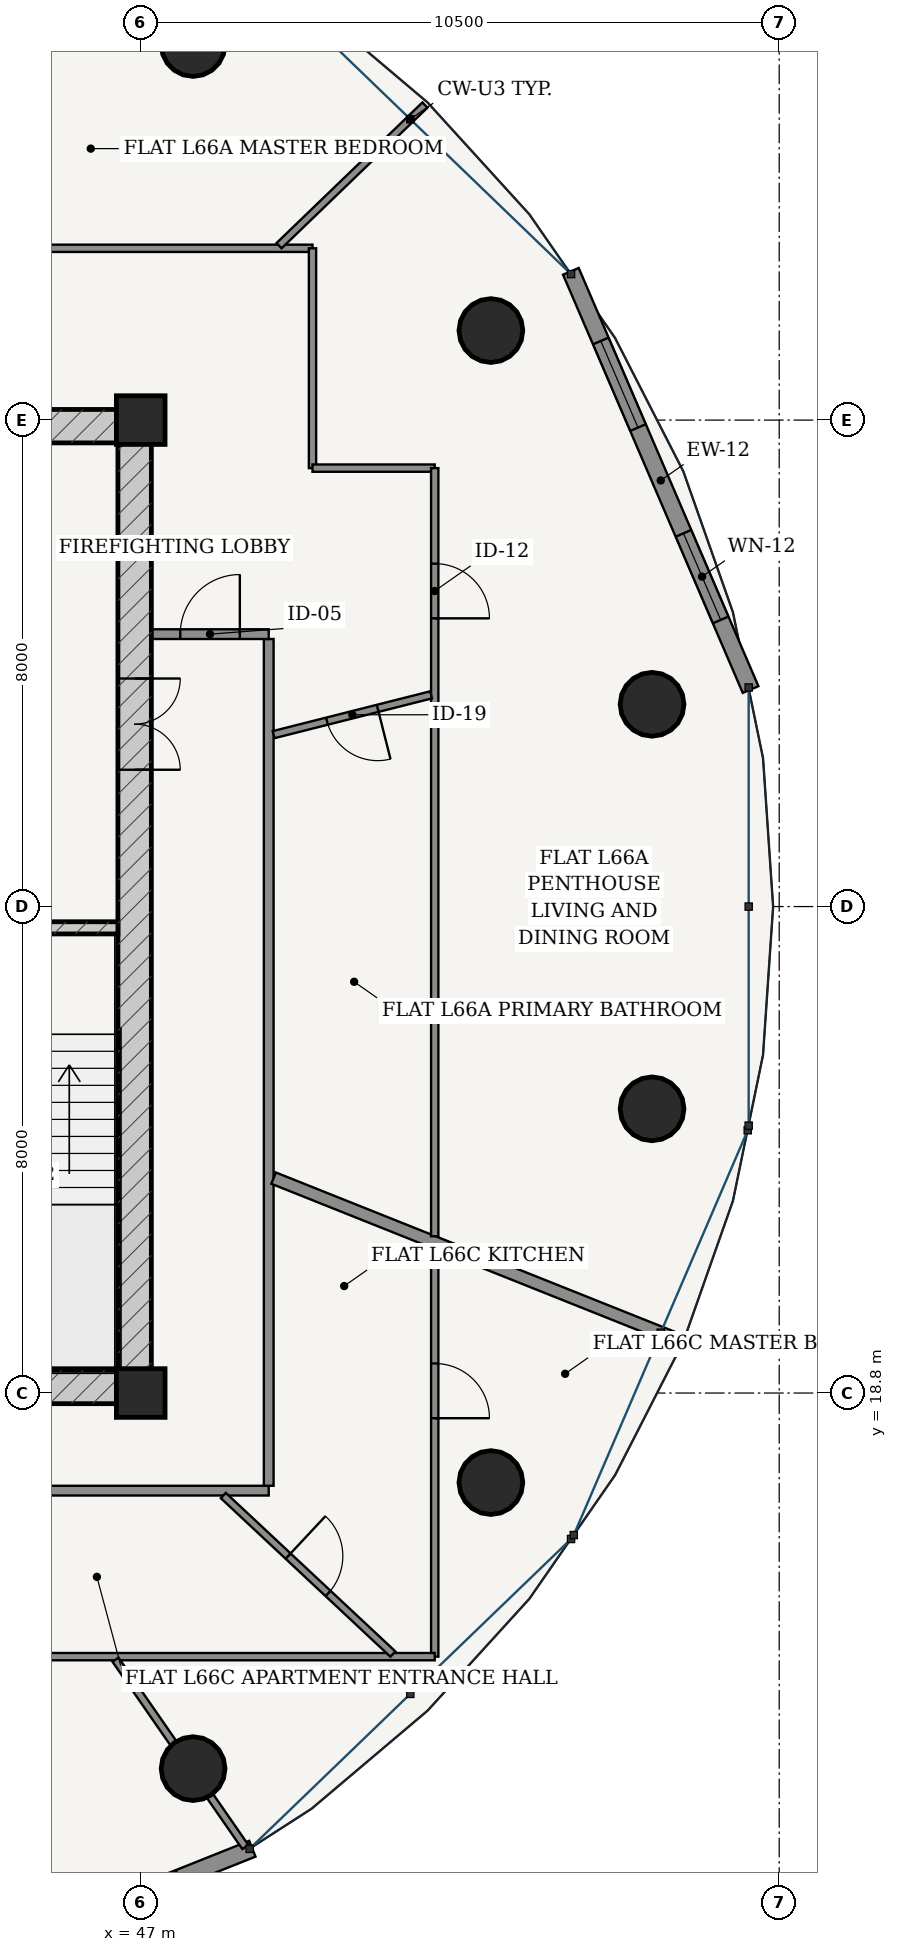
"""IFC4 building model, lengths in metres.
Left out: names, types, materials, properties, quantities, classifications, styles, units other than length and angle.
Written with IfcOpenShell. Run it as: python <this file> out.ifc"""

import sys

from ifc_helpers import new_model, si_unit, direction, frame, frame_2d, origin, origin_2d, place, context, subcontext, project, spatial, rectangle, hollow_circle, extrude, source, transform, mapped, element, fill, save


model = new_model("IFC4")
c1 = context("Model", 3, precision=1e-05, world=origin(), true_north=direction((-0.2419218956, 0.970295726276)))
c2 = subcontext(c1, "Body", "Model", "MODEL_VIEW")
j1 = project(units=[si_unit("LENGTHUNIT", "METRE"), si_unit("PLANEANGLEUNIT", "RADIAN")], contexts=[c1])
p1 = place(None, origin())
s1 = spatial("IfcSite", under=j1, at=p1, CompositionType="ELEMENT")
p2 = place(p1, origin())
s2 = spatial("IfcBuilding", under=s1, at=p2, CompositionType="ELEMENT")
p3 = place(p2, frame((0.0, 0.0, 251.95)))
s3 = spatial("IfcBuildingStorey", under=s2, at=p3, CompositionType="ELEMENT", Elevation=251.95)
for number, where, z_axis, x_axis in (
    (1, (47.0, 18.8, 0.0), (0.0, 0.0, 1.0), (1.0, 0.0, 0.0)),
    (2, (47.0, 34.8, 0.0), (0.0, 0.0, 1.0), (1.0, 0.0, 0.0)),
):
    element("IfcColumn", number, at=place(p3, frame(where, z_axis=z_axis, x_axis=x_axis)), inside=s3, PredefinedType="COLUMN", context=c2, shape_type="SweptSolid", body=[
        extrude(rectangle(XDim=0.8, YDim=0.8, at=origin_2d()), origin(), (0.0, 0.0, 1.0), 3.75),
    ])
p4 = place(p3, frame((28.825, 18.9, 0.0), z_axis=(0.0, 0.0, 1.0), x_axis=(1.0, 0.0, 0.0)))
e3 = element("IfcWall", 3, at=p4, inside=s3, PredefinedType="SHEAR", context=c2, shape_type="SweptSolid", body=[
    extrude(rectangle(XDim=18.35, YDim=0.55, at=frame_2d((9.175, 0.0))), origin(), (0.0, 0.0, 1.0), 3.49),
])
p5 = place(p4, frame((7.41, 0.0, 0.0)))
e4 = element("IfcOpeningElement", 4, at=p5, cuts=e3, PredefinedType="OPENING", context=c2, shape_type="SweptSolid", body=[
    extrude(rectangle(XDim=0.85, YDim=2.1, at=frame_2d((0.425, 1.05))), frame((0.0, 0.285, 0.0), z_axis=(0.0, -1.0, 0.0), x_axis=(1.0, 0.0, 0.0)), (0.0, 0.0, 1.0), 0.57),
])
p6 = place(p4, frame((10.49, 0.0, 0.0)))
e5 = element("IfcOpeningElement", 5, at=p6, cuts=e3, PredefinedType="OPENING", context=c2, shape_type="SweptSolid", body=[
    extrude(rectangle(XDim=0.85, YDim=2.1, at=frame_2d((0.425, 1.05))), frame((0.0, 0.285, 0.0), z_axis=(0.0, -1.0, 0.0), x_axis=(1.0, 0.0, 0.0)), (0.0, 0.0, 1.0), 0.57),
])
p7 = place(p3, frame((28.825, 34.7, 0.0), z_axis=(0.0, 0.0, 1.0), x_axis=(1.0, 0.0, 0.0)))
e6 = element("IfcWall", 6, at=p7, inside=s3, PredefinedType="SHEAR", context=c2, shape_type="SweptSolid", body=[
    extrude(rectangle(XDim=18.35, YDim=0.55, at=frame_2d((9.175, 0.0))), origin(), (0.0, 0.0, 1.0), 3.49),
])
p8 = place(p3, frame((46.9, 19.175, 0.0), z_axis=(0.0, 0.0, 1.0), x_axis=(0.0, 1.0, 0.0)))
e7 = element("IfcWall", 7, at=p8, inside=s3, PredefinedType="SHEAR", context=c2, shape_type="SweptSolid", body=[
    extrude(rectangle(XDim=15.25, YDim=0.55, at=frame_2d((7.625, 0.0))), origin(), (0.0, 0.0, 1.0), 3.49),
])
p9 = place(p8, frame((9.875, 0.0, 0.0)))
e8 = element("IfcOpeningElement", 8, at=p9, cuts=e7, PredefinedType="OPENING", context=c2, shape_type="SweptSolid", body=[
    extrude(rectangle(XDim=1.5, YDim=2.2, at=frame_2d((0.75, 1.1))), frame((0.0, 0.285, 0.0), z_axis=(0.0, -1.0, 0.0), x_axis=(1.0, 0.0, 0.0)), (0.0, 0.0, 1.0), 0.57),
])
p10 = place(p3, frame((43.305, 26.45, 0.0), z_axis=(0.0, 0.0, 1.0), x_axis=(1.0, 0.0, 0.0)))
e9 = element("IfcWall", 9, at=p10, inside=s3, PredefinedType="SOLIDWALL", context=c2, shape_type="SweptSolid", body=[
    extrude(rectangle(XDim=3.32, YDim=0.2, at=frame_2d((1.66, 0.0))), origin(), (0.0, 0.0, 1.0), 3.49),
])
p11 = place(p10, frame((1.185, 0.0, 0.0)))
e10 = element("IfcOpeningElement", 10, at=p11, cuts=e9, PredefinedType="OPENING", context=c2, shape_type="SweptSolid", body=[
    extrude(rectangle(XDim=0.95, YDim=2.15, at=frame_2d((0.475, 1.075))), frame((0.0, 0.11, 0.0), z_axis=(0.0, -1.0, 0.0), x_axis=(1.0, 0.0, 0.0)), (0.0, 0.0, 1.0), 0.22),
])
for number, where, z_axis, x_axis in (
    (11, (55.409, 30.126, 0.0), (0.0, 0.0, 1.0), (1.0, 0.0, 0.0)),
    (12, (52.759, 36.272, 0.0), (0.0, 0.0, 1.0), (1.0, 0.0, 0.0)),
    (13, (47.861, 40.977, 0.0), (0.0, 0.0, 1.0), (1.0, 0.0, 0.0)),
    (14, (47.861, 12.624, 0.0), (0.0, 0.0, 1.0), (1.0, 0.0, 0.0)),
    (15, (52.759, 17.328, 0.0), (0.0, 0.0, 1.0), (1.0, 0.0, 0.0)),
    (16, (55.409, 23.474, 0.0), (0.0, 0.0, 1.0), (1.0, 0.0, 0.0)),
):
    element("IfcColumn", number, at=place(p3, frame(where, z_axis=z_axis, x_axis=x_axis)), inside=s3, PredefinedType="COLUMN", context=c2, shape_type="SweptSolid", body=[
        extrude(hollow_circle(Radius=0.525, WallThickness=0.035, at=origin_2d()), origin(), (0.0, 0.0, 1.0), 3.75),
    ])
p12 = place(p3, frame((57.029, 30.369, 0.0), z_axis=(0.0, 0.0, 1.0), x_axis=(-0.394816612978, 0.918759948037, 0.0)))
e17 = element("IfcWall", 17, at=p12, inside=s3, PredefinedType="SOLIDWALL", context=c2, shape_type="SweptSolid", body=[
    extrude(rectangle(XDim=7.485, YDim=0.28, at=frame_2d((3.743, 0.0))), origin(), (0.0, 0.0, 1.0), 3.49),
])
p13 = place(p12, frame((1.246, 0.0, 0.85)))
e18 = element("IfcOpeningElement", 18, at=p13, cuts=e17, PredefinedType="OPENING", context=c2, shape_type="SweptSolid", body=[
    extrude(rectangle(XDim=1.55, YDim=1.95, at=frame_2d((0.775, 0.975))), frame((0.0, 0.15, 0.0), z_axis=(0.0, -1.0, 0.0), x_axis=(1.0, 0.0, 0.0)), (0.0, 0.0, 1.0), 0.3),
])
p14 = place(p12, frame((4.689, 0.0, 0.85)))
e19 = element("IfcOpeningElement", 19, at=p14, cuts=e17, PredefinedType="OPENING", context=c2, shape_type="SweptSolid", body=[
    extrude(rectangle(XDim=1.55, YDim=1.95, at=frame_2d((0.775, 0.975))), frame((0.0, 0.15, 0.0), z_axis=(0.0, -1.0, 0.0), x_axis=(1.0, 0.0, 0.0)), (0.0, 0.0, 1.0), 0.3),
])
p15 = place(p3, frame((41.705, 8.459, 0.0), z_axis=(0.0, 0.0, 1.0), x_axis=(0.92871332341, 0.370798547626, 0.0)))
e20 = element("IfcWall", 20, at=p15, inside=s3, PredefinedType="SOLIDWALL", context=c2, shape_type="SweptSolid", body=[
    extrude(rectangle(XDim=7.678, YDim=0.28, at=frame_2d((3.839, 0.0))), origin(), (0.0, 0.0, 1.0), 3.49),
])
p16 = place(p15, frame((1.298, 0.0, 0.85)))
e21 = element("IfcOpeningElement", 21, at=p16, cuts=e20, PredefinedType="OPENING", context=c2, shape_type="SweptSolid", body=[
    extrude(rectangle(XDim=1.55, YDim=1.95, at=frame_2d((0.775, 0.975))), frame((0.0, 0.15, 0.0), z_axis=(0.0, -1.0, 0.0), x_axis=(1.0, 0.0, 0.0)), (0.0, 0.0, 1.0), 0.3),
])
p17 = place(p15, frame((4.83, 0.0, 0.85)))
e22 = element("IfcOpeningElement", 22, at=p17, cuts=e20, PredefinedType="OPENING", context=c2, shape_type="SweptSolid", body=[
    extrude(rectangle(XDim=1.55, YDim=1.95, at=frame_2d((0.775, 0.975))), frame((0.0, 0.15, 0.0), z_axis=(0.0, -1.0, 0.0), x_axis=(1.0, 0.0, 0.0)), (0.0, 0.0, 1.0), 0.3),
])
p18 = place(p3, frame((26.895, 17.195, 0.0), z_axis=(0.0, 0.0, 1.0), x_axis=(1.0, 0.0, 0.0)))
e23 = element("IfcWall", 23, at=p18, inside=s3, PredefinedType="PARTITIONING", context=c2, shape_type="SweptSolid", body=[
    extrude(rectangle(XDim=22.21, YDim=0.16, at=frame_2d((11.105, 0.0))), origin(), (0.0, 0.0, 1.0), 3.015),
])
p19 = place(p18, frame((2.861, 0.0, 0.0)))
e24 = element("IfcOpeningElement", 24, at=p19, cuts=e23, PredefinedType="OPENING", context=c2, shape_type="SweptSolid", body=[
    extrude(rectangle(XDim=0.98, YDim=2.2, at=frame_2d((0.49, 1.1))), frame((0.0, 0.09, 0.0), z_axis=(0.0, -1.0, 0.0), x_axis=(1.0, 0.0, 0.0)), (0.0, 0.0, 1.0), 0.18),
])
p20 = place(p18, frame((16.97, 0.0, 0.0)))
e25 = element("IfcOpeningElement", 25, at=p20, cuts=e23, PredefinedType="OPENING", context=c2, shape_type="SweptSolid", body=[
    extrude(rectangle(XDim=0.98, YDim=2.2, at=frame_2d((0.49, 1.1))), frame((0.0, 0.09, 0.0), z_axis=(0.0, -1.0, 0.0), x_axis=(1.0, 0.0, 0.0)), (0.0, 0.0, 1.0), 0.18),
])
p21 = place(p3, frame((49.105, 17.275, 0.0), z_axis=(0.0, 0.0, 1.0), x_axis=(0.0, 1.0, 0.0)))
e26 = element("IfcWall", 26, at=p21, inside=s3, PredefinedType="PARTITIONING", context=c2, shape_type="SweptSolid", body=[
    extrude(rectangle(XDim=13.925, YDim=0.16, at=frame_2d((6.962, 0.0))), origin(), (0.0, 0.0, 1.0), 3.015),
])
p22 = place(p3, frame((47.175, 31.28, 0.0), z_axis=(0.0, 0.0, 1.0), x_axis=(1.0, 0.0, 0.0)))
e27 = element("IfcWall", 27, at=p22, inside=s3, PredefinedType="PARTITIONING", context=c2, shape_type="SweptSolid", body=[
    extrude(rectangle(XDim=1.93, YDim=0.16, at=frame_2d((0.965, 0.0))), origin(), (0.0, 0.0, 1.0), 3.49),
])
p23 = place(p22, frame((0.475, 0.0, 0.0)))
e28 = element("IfcOpeningElement", 28, at=p23, cuts=e27, PredefinedType="OPENING", context=c2, shape_type="SweptSolid", body=[
    extrude(rectangle(XDim=0.98, YDim=2.2, at=frame_2d((0.49, 1.1))), frame((0.0, 0.09, 0.0), z_axis=(0.0, -1.0, 0.0), x_axis=(1.0, 0.0, 0.0)), (0.0, 0.0, 1.0), 0.18),
])
p24 = place(p3, frame((49.185, 22.334, 0.0), z_axis=(0.0, 0.0, 1.0), x_axis=(0.928710518269, -0.370805573389, 0.0)))
e29 = element("IfcWall", 29, at=p24, inside=s3, PredefinedType="PARTITIONING", context=c2, shape_type="SweptSolid", body=[
    extrude(rectangle(XDim=7.195, YDim=0.2, at=frame_2d((3.598, 0.0))), origin(), (0.0, 0.0, 1.0), 3.121),
])
p25 = place(p3, frame((26.175, 37.625, 0.0), z_axis=(0.0, 0.0, 1.0), x_axis=(1.0, 0.0, 0.0)))
e30 = element("IfcWall", 30, at=p25, inside=s3, PredefinedType="PARTITIONING", context=c2, shape_type="SweptSolid", body=[
    extrude(rectangle(XDim=23.65, YDim=0.12, at=frame_2d((11.825, 0.0))), origin(), (0.0, 0.0, 1.0), 3.015),
])
p26 = place(p25, frame((12.791, 0.0, 0.0)))
e31 = element("IfcOpeningElement", 31, at=p26, cuts=e30, PredefinedType="OPENING", context=c2, shape_type="SweptSolid", body=[
    extrude(rectangle(XDim=0.9, YDim=2.15, at=frame_2d((0.45, 1.075))), frame((0.0, 0.07, 0.0), z_axis=(0.0, -1.0, 0.0), x_axis=(1.0, 0.0, 0.0)), (0.0, 0.0, 1.0), 0.14),
])
p27 = place(p25, frame((6.48, 0.0, 0.0)))
e32 = element("IfcOpeningElement", 32, at=p27, cuts=e30, PredefinedType="OPENING", context=c2, shape_type="SweptSolid", body=[
    extrude(rectangle(XDim=0.9, YDim=2.15, at=frame_2d((0.45, 1.075))), frame((0.0, 0.07, 0.0), z_axis=(0.0, -1.0, 0.0), x_axis=(1.0, 0.0, 0.0)), (0.0, 0.0, 1.0), 0.14),
])
p28 = place(p25, frame((1.831, 0.0, 0.0)))
e33 = element("IfcOpeningElement", 33, at=p28, cuts=e30, PredefinedType="OPENING", context=c2, shape_type="SweptSolid", body=[
    extrude(rectangle(XDim=0.9, YDim=2.15, at=frame_2d((0.45, 1.075))), frame((0.0, 0.07, 0.0), z_axis=(0.0, -1.0, 0.0), x_axis=(1.0, 0.0, 0.0)), (0.0, 0.0, 1.0), 0.14),
])
p29 = place(p3, frame((49.825, 37.625, 0.0), z_axis=(0.0, 0.0, 1.0), x_axis=(0.0, -1.0, 0.0)))
e34 = element("IfcWall", 34, at=p29, inside=s3, PredefinedType="PARTITIONING", context=c2, shape_type="SweptSolid", body=[
    extrude(rectangle(XDim=3.615, YDim=0.12, at=frame_2d((1.808, 0.0))), origin(), (0.0, 0.0, 1.0), 3.015),
])
p30 = place(p3, frame((49.825, 34.01, 0.0), z_axis=(0.0, 0.0, 1.0), x_axis=(1.0, 0.0, 0.0)))
e35 = element("IfcWall", 35, at=p30, inside=s3, PredefinedType="PARTITIONING", context=c2, shape_type="SweptSolid", body=[
    extrude(rectangle(XDim=2.01, YDim=0.12, at=frame_2d((1.005, 0.0))), origin(), (0.0, 0.0, 1.0), 3.209),
])
p31 = place(p3, frame((51.835, 34.01, 0.0), z_axis=(0.0, 0.0, 1.0), x_axis=(0.0, -1.0, 0.0)))
e36 = element("IfcWall", 36, at=p31, inside=s3, PredefinedType="PARTITIONING", context=c2, shape_type="SweptSolid", body=[
    extrude(rectangle(XDim=12.632, YDim=0.12, at=frame_2d((6.316, 0.0))), origin(), (0.0, 0.0, 1.0), 3.015),
])
p32 = place(p31, frame((1.57, 0.0, 0.0)))
e37 = element("IfcOpeningElement", 37, at=p32, cuts=e36, PredefinedType="OPENING", context=c2, shape_type="SweptSolid", body=[
    extrude(rectangle(XDim=0.9, YDim=2.15, at=frame_2d((0.45, 1.075))), frame((0.0, 0.07, 0.0), z_axis=(0.0, -1.0, 0.0), x_axis=(1.0, 0.0, 0.0)), (0.0, 0.0, 1.0), 0.14),
])
p33 = place(p3, frame((49.275, 37.668, 0.0), z_axis=(0.0, 0.0, 1.0), x_axis=(0.719954096891, 0.694021684366, 0.0)))
e38 = element("IfcWall", 38, at=p33, inside=s3, PredefinedType="PARTITIONING", context=c2, shape_type="SweptSolid", body=[
    extrude(rectangle(XDim=3.333, YDim=0.12, at=frame_2d((1.667, 0.0))), origin(), (0.0, 0.0, 1.0), 3.121),
])
p34 = place(p3, frame((49.185, 29.627, 0.0), z_axis=(0.0, 0.0, 1.0), x_axis=(0.969515658159, 0.2450293627, 0.0)))
e39 = element("IfcWall", 39, at=p34, inside=s3, PredefinedType="PARTITIONING", context=c2, shape_type="SweptSolid", body=[
    extrude(rectangle(XDim=2.671, YDim=0.12, at=frame_2d((1.336, 0.0))), origin(), (0.0, 0.0, 1.0), 3.209),
])
p35 = place(p34, frame((0.906, 0.0, 0.0)))
e40 = element("IfcOpeningElement", 40, at=p35, cuts=e39, PredefinedType="OPENING", context=c2, shape_type="SweptSolid", body=[
    extrude(rectangle(XDim=0.86, YDim=2.15, at=frame_2d((0.43, 1.075))), frame((0.0, 0.07, 0.0), z_axis=(0.0, -1.0, 0.0), x_axis=(1.0, 0.0, 0.0)), (0.0, 0.0, 1.0), 0.14),
])
p36 = place(p3, frame((51.835, 21.174, 0.0), z_axis=(0.0, 0.0, 1.0), x_axis=(0.0, -1.0, 0.0)))
e41 = element("IfcWall", 41, at=p36, inside=s3, PredefinedType="PARTITIONING", context=c2, shape_type="SweptSolid", body=[
    extrude(rectangle(XDim=6.709, YDim=0.12, at=frame_2d((3.354, 0.0))), origin(), (0.0, 0.0, 1.0), 3.015),
])
p37 = place(p36, frame((1.888, 0.0, 0.0)))
e42 = element("IfcOpeningElement", 42, at=p37, cuts=e41, PredefinedType="OPENING", context=c2, shape_type="SweptSolid", body=[
    extrude(rectangle(XDim=0.9, YDim=2.15, at=frame_2d((0.45, 1.075))), frame((0.0, 0.07, 0.0), z_axis=(0.0, -1.0, 0.0), x_axis=(1.0, 0.0, 0.0)), (0.0, 0.0, 1.0), 0.14),
])
p38 = place(p3, frame((51.835, 14.465, 0.0), z_axis=(0.0, 0.0, 1.0), x_axis=(-1.0, 0.0, 0.0)))
e43 = element("IfcWall", 43, at=p38, inside=s3, PredefinedType="PARTITIONING", context=c2, shape_type="SweptSolid", body=[
    extrude(rectangle(XDim=16.278, YDim=0.12, at=frame_2d((8.139, 0.0))), origin(), (0.0, 0.0, 1.0), 3.015),
])
p39 = place(p38, frame((7.665, 0.0, 0.0)))
e44 = element("IfcOpeningElement", 44, at=p39, cuts=e43, PredefinedType="OPENING", context=c2, shape_type="SweptSolid", body=[
    extrude(rectangle(XDim=0.9, YDim=2.15, at=frame_2d((0.45, 1.075))), frame((0.0, 0.07, 0.0), z_axis=(0.0, -1.0, 0.0), x_axis=(1.0, 0.0, 0.0)), (0.0, 0.0, 1.0), 0.14),
])
p40 = place(p3, frame((46.586, 14.414, 0.0), z_axis=(0.0, 0.0, 1.0), x_axis=(0.569657021681, -0.821882520589, 0.0)))
e45 = element("IfcWall", 45, at=p40, inside=s3, PredefinedType="PARTITIONING", context=c2, shape_type="SweptSolid", body=[
    extrude(rectangle(XDim=3.748, YDim=0.12, at=frame_2d((1.874, 0.0))), origin(), (0.0, 0.0, 1.0), 3.015),
])
p41 = place(p3, frame((48.358, 17.115, 0.0), z_axis=(0.0, 0.0, 1.0), x_axis=(0.730431927487, -0.682985504464, 0.0)))
e46 = element("IfcWall", 46, at=p41, inside=s3, PredefinedType="PARTITIONING", context=c2, shape_type="SweptSolid", body=[
    extrude(rectangle(XDim=3.818, YDim=0.12, at=frame_2d((1.909, 0.0))), origin(), (0.0, 0.0, 1.0), 3.121),
])
p42 = place(p41, frame((1.459, 0.0, 0.0)))
e47 = element("IfcOpeningElement", 47, at=p42, cuts=e46, PredefinedType="OPENING", context=c2, shape_type="SweptSolid", body=[
    extrude(rectangle(XDim=0.9, YDim=2.15, at=frame_2d((0.45, 1.075))), frame((0.0, 0.07, 0.0), z_axis=(0.0, -1.0, 0.0), x_axis=(1.0, 0.0, 0.0)), (0.0, 0.0, 1.0), 0.14),
])
m1 = source(origin(), c2, "Body", "SweptSolid", [
    extrude(rectangle(XDim=1.55, YDim=1.95, at=frame_2d((0.775, 0.975))), frame((0.0, 0.03, 0.0), z_axis=(0.0, -1.0, 0.0), x_axis=(1.0, 0.0, 0.0)), (0.0, 0.0, 1.0), 0.06),
])
p43 = place(p13, origin())
e48 = element("IfcWindow", 48, at=p43, inside=s3, PartitioningType="SINGLE_PANEL", PredefinedType="WINDOW", context=c2, shape_type="MappedRepresentation", body=[
    mapped(m1, transform((0.0, 0.0, 0.0), scale=1.0)),
])
fill(e18, e48)
p44 = place(p14, origin())
e49 = element("IfcWindow", 49, at=p44, inside=s3, PartitioningType="SINGLE_PANEL", PredefinedType="WINDOW", context=c2, shape_type="MappedRepresentation", body=[
    mapped(m1, transform((0.0, 0.0, 0.0), scale=1.0)),
])
fill(e19, e49)
m2 = source(origin(), c2, "Body", "SweptSolid", [
    extrude(rectangle(XDim=1.5, YDim=2.2, at=frame_2d((0.75, 1.1))), frame((0.0, 0.025, 0.0), z_axis=(0.0, -1.0, 0.0), x_axis=(1.0, 0.0, 0.0)), (0.0, 0.0, 1.0), 0.05),
])
p45 = place(p9, frame((1.5, 0.0, 0.0), z_axis=(0.0, 0.0, 1.0), x_axis=(-1.0, 0.0, 0.0)))
e50 = element("IfcDoor", 50, at=p45, inside=s3, OperationType="DOUBLE_DOOR_SINGLE_SWING", PredefinedType="DOOR", context=c2, shape_type="MappedRepresentation", body=[
    mapped(m2, transform((0.0, 0.0, 0.0), scale=1.0)),
])
fill(e8, e50)
m3 = source(origin(), c2, "Body", "SweptSolid", [
    extrude(rectangle(XDim=0.98, YDim=2.2, at=frame_2d((0.49, 1.1))), frame((0.0, 0.025, 0.0), z_axis=(0.0, -1.0, 0.0), x_axis=(1.0, 0.0, 0.0)), (0.0, 0.0, 1.0), 0.05),
])
p46 = place(p23, origin())
e51 = element("IfcDoor", 51, at=p46, inside=s3, OperationType="SINGLE_SWING_RIGHT", PredefinedType="DOOR", context=c2, shape_type="MappedRepresentation", body=[
    mapped(m3, transform((0.0, 0.0, 0.0), scale=1.0)),
])
fill(e28, e51)
m4 = source(origin(), c2, "Body", "SweptSolid", [
    extrude(rectangle(XDim=0.86, YDim=2.15, at=frame_2d((0.43, 1.075))), frame((0.0, 0.025, 0.0), z_axis=(0.0, -1.0, 0.0), x_axis=(1.0, 0.0, 0.0)), (0.0, 0.0, 1.0), 0.05),
])
p47 = place(p35, frame((0.86, 0.0, 0.0), z_axis=(0.0, 0.0, 1.0), x_axis=(-1.0, 0.0, 0.0)))
e52 = element("IfcDoor", 52, at=p47, inside=s3, OperationType="SINGLE_SWING_LEFT", PredefinedType="DOOR", context=c2, shape_type="MappedRepresentation", body=[
    mapped(m4, transform((0.0, 0.0, 0.0), scale=1.0)),
])
fill(e40, e52)
m5 = source(origin(), c2, "Body", "SweptSolid", [
    extrude(rectangle(XDim=0.9, YDim=2.15, at=frame_2d((0.45, 1.075))), frame((0.0, 0.025, 0.0), z_axis=(0.0, -1.0, 0.0), x_axis=(1.0, 0.0, 0.0)), (0.0, 0.0, 1.0), 0.05),
])
p48 = place(p32, origin())
e53 = element("IfcDoor", 53, at=p48, inside=s3, OperationType="SINGLE_SWING_RIGHT", PredefinedType="DOOR", context=c2, shape_type="MappedRepresentation", body=[
    mapped(m5, transform((0.0, 0.0, 0.0), scale=1.0)),
])
fill(e37, e53)
p49 = place(p42, origin())
e54 = element("IfcDoor", 54, at=p49, inside=s3, OperationType="SINGLE_SWING_LEFT", PredefinedType="DOOR", context=c2, shape_type="MappedRepresentation", body=[
    mapped(m5, transform((0.0, 0.0, 0.0), scale=1.0)),
])
fill(e47, e54)
p50 = place(p37, origin())
e55 = element("IfcDoor", 55, at=p50, inside=s3, OperationType="SINGLE_SWING_RIGHT", PredefinedType="DOOR", context=c2, shape_type="MappedRepresentation", body=[
    mapped(m5, transform((0.0, 0.0, 0.0), scale=1.0)),
])
fill(e42, e55)
save(model, sys.argv[1])
